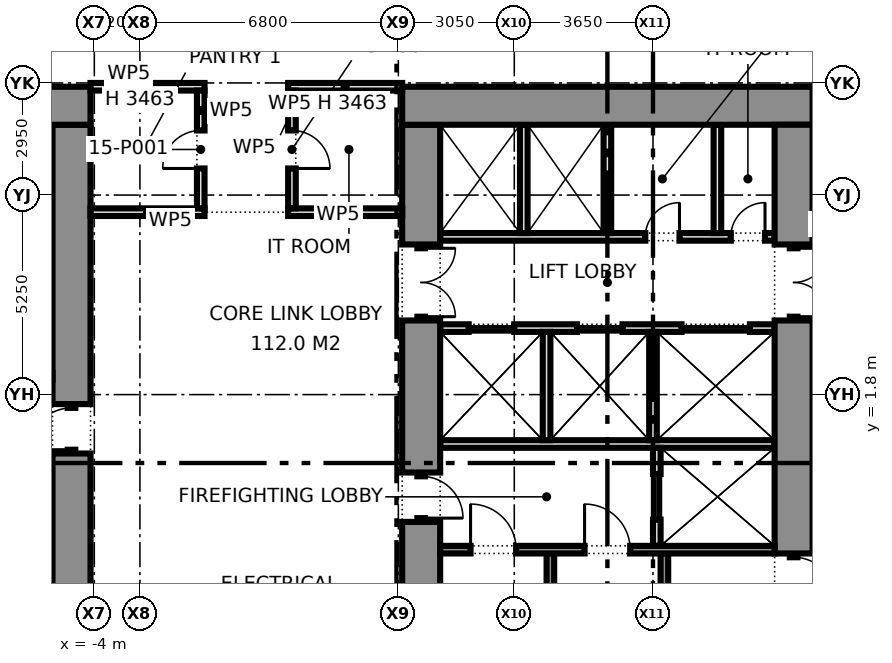
"""IFC4 building model, lengths in metres.
Left out: names, types, materials, properties, quantities, classifications, styles, units other than length and angle.
Written with IfcOpenShell. Run it as: python <this file> out.ifc"""

import sys

from ifc_helpers import new_model, si_unit, direction, frame, frame_2d, origin, place, context, subcontext, project, spatial, rectangle, extrude, element, fill, save


model = new_model("IFC4")
c1 = context("Model", 3, precision=1e-05, world=origin(), true_north=direction((0.0, 1.0)))
c2 = subcontext(c1, "Body", "Model", "MODEL_VIEW")
j1 = project(units=[si_unit("LENGTHUNIT", "METRE"), si_unit("PLANEANGLEUNIT", "RADIAN")], contexts=[c1])
p1 = place(None, origin())
s1 = spatial("IfcSite", under=j1, at=p1, CompositionType="ELEMENT")
p2 = place(p1, origin())
s2 = spatial("IfcBuilding", under=s1, at=p2, CompositionType="ELEMENT")
p3 = place(p2, frame((0.0, 0.0, 68.6)))
s3 = spatial("IfcBuildingStorey", under=s2, at=p3, CompositionType="ELEMENT", Elevation=68.6)
p4 = place(p3, frame((-14.9, 9.4, 0.0), z_axis=(0.0, 0.0, 1.0), x_axis=(1.0, 0.0, 0.0)))
e1 = element("IfcWall", 1, at=p4, inside=s3, PredefinedType="SHEAR", context=c2, shape_type="SweptSolid", body=[
    extrude(rectangle(XDim=10.8, YDim=1.0, at=frame_2d((5.4, 0.0))), origin(), (0.0, 0.0, 1.0), 4.4),
])
p5 = place(p3, frame((-4.6, -3.75, 0.0), z_axis=(0.0, 0.0, 1.0), x_axis=(0.0, 1.0, 0.0)))
e2 = element("IfcWall", 2, at=p5, inside=s3, PredefinedType="SHEAR", context=c2, shape_type="SweptSolid", body=[
    extrude(rectangle(XDim=4.0, YDim=1.0, at=frame_2d((2.0, 0.0))), origin(), (0.0, 0.0, 1.0), 4.4),
])
p6 = place(p3, frame((-4.6, 0.25, 0.0), z_axis=(0.0, 0.0, 1.0), x_axis=(0.0, 1.0, 0.0)))
e3 = element("IfcWall", 3, at=p6, inside=s3, PredefinedType="PARTITIONING", context=c2, shape_type="SweptSolid", body=[
    extrude(rectangle(XDim=1.3, YDim=0.2, at=frame_2d((0.65, 0.0))), origin(), (0.0, 0.0, 1.0), 2.4),
])
p7 = place(p6, frame((0.1, 0.0, 0.0)))
e4 = element("IfcOpeningElement", 4, at=p7, cuts=e3, PredefinedType="OPENING", context=c2, shape_type="SweptSolid", body=[
    extrude(rectangle(XDim=1.1, YDim=2.1, at=frame_2d((0.55, 1.05))), frame((0.0, 0.11, 0.0), z_axis=(0.0, -1.0, 0.0), x_axis=(1.0, 0.0, 0.0)), (0.0, 0.0, 1.0), 0.22),
])
p8 = place(p3, frame((-4.6, 1.55, 0.0), z_axis=(0.0, 0.0, 1.0), x_axis=(0.0, 1.0, 0.0)))
e5 = element("IfcWall", 5, at=p8, inside=s3, PredefinedType="SHEAR", context=c2, shape_type="SweptSolid", body=[
    extrude(rectangle(XDim=7.35, YDim=1.0, at=frame_2d((3.675, 0.0))), origin(), (0.0, 0.0, 1.0), 4.4),
])
p9 = place(p3, frame((14.9, 9.4, 0.0), z_axis=(0.0, 0.0, 1.0), x_axis=(-1.0, 0.0, 0.0)))
e6 = element("IfcWall", 6, at=p9, inside=s3, PredefinedType="SHEAR", context=c2, shape_type="SweptSolid", body=[
    extrude(rectangle(XDim=10.8, YDim=1.0, at=frame_2d((5.4, 0.0))), origin(), (0.0, 0.0, 1.0), 4.4),
])
p10 = place(p3, frame((14.4, 8.9, 0.0), z_axis=(0.0, 0.0, 1.0), x_axis=(0.0, -1.0, 0.0)))
e7 = element("IfcWall", 7, at=p10, inside=s3, PredefinedType="SHEAR", context=c2, shape_type="SweptSolid", body=[
    extrude(rectangle(XDim=3.15, YDim=1.0, at=frame_2d((1.575, 0.0))), origin(), (0.0, 0.0, 1.0), 4.4),
])
p11 = place(p3, frame((14.4, 5.75, 0.0), z_axis=(0.0, 0.0, 1.0), x_axis=(0.0, -1.0, 0.0)))
e8 = element("IfcWall", 8, at=p11, inside=s3, PredefinedType="PARTITIONING", context=c2, shape_type="SweptSolid", body=[
    extrude(rectangle(XDim=2.0, YDim=0.2, at=frame_2d((1.0, 0.0))), origin(), (0.0, 0.0, 1.0), 2.4),
])
p12 = place(p11, frame((0.1, 0.0, 0.0)))
e9 = element("IfcOpeningElement", 9, at=p12, cuts=e8, PredefinedType="OPENING", context=c2, shape_type="SweptSolid", body=[
    extrude(rectangle(XDim=1.8, YDim=2.1, at=frame_2d((0.9, 1.05))), frame((0.0, 0.11, 0.0), z_axis=(0.0, -1.0, 0.0), x_axis=(1.0, 0.0, 0.0)), (0.0, 0.0, 1.0), 0.22),
])
p13 = place(p3, frame((14.4, 3.75, 0.0), z_axis=(0.0, 0.0, 1.0), x_axis=(0.0, -1.0, 0.0)))
e10 = element("IfcWall", 10, at=p13, inside=s3, PredefinedType="SHEAR", context=c2, shape_type="SweptSolid", body=[
    extrude(rectangle(XDim=6.13, YDim=1.0, at=frame_2d((3.065, 0.0))), origin(), (0.0, 0.0, 1.0), 4.4),
])
p14 = place(p3, frame((14.4, -2.38, 0.0), z_axis=(0.0, 0.0, 1.0), x_axis=(0.0, -1.0, 0.0)))
e11 = element("IfcWall", 11, at=p14, inside=s3, PredefinedType="SHEAR", context=c2, shape_type="SweptSolid", body=[
    extrude(rectangle(XDim=1.3, YDim=0.2, at=frame_2d((0.65, 0.0))), origin(), (0.0, 0.0, 1.0), 2.4),
])
p15 = place(p14, frame((0.1, 0.0, 0.0)))
e12 = element("IfcOpeningElement", 12, at=p15, cuts=e11, PredefinedType="OPENING", context=c2, shape_type="SweptSolid", body=[
    extrude(rectangle(XDim=1.1, YDim=2.1, at=frame_2d((0.55, 1.05))), frame((0.0, 0.11, 0.0), z_axis=(0.0, -1.0, 0.0), x_axis=(1.0, 0.0, 0.0)), (0.0, 0.0, 1.0), 0.22),
])
p16 = place(p3, frame((4.6, 8.9, 0.0), z_axis=(0.0, 0.0, 1.0), x_axis=(0.0, -1.0, 0.0)))
e13 = element("IfcWall", 13, at=p16, inside=s3, PredefinedType="SHEAR", context=c2, shape_type="SweptSolid", body=[
    extrude(rectangle(XDim=3.15, YDim=1.0, at=frame_2d((1.575, 0.0))), origin(), (0.0, 0.0, 1.0), 4.4),
])
p17 = place(p3, frame((4.6, 5.75, 0.0), z_axis=(0.0, 0.0, 1.0), x_axis=(0.0, -1.0, 0.0)))
e14 = element("IfcWall", 14, at=p17, inside=s3, PredefinedType="PARTITIONING", context=c2, shape_type="SweptSolid", body=[
    extrude(rectangle(XDim=2.0, YDim=0.2, at=frame_2d((1.0, 0.0))), origin(), (0.0, 0.0, 1.0), 2.4),
])
p18 = place(p17, frame((0.1, 0.0, 0.0)))
e15 = element("IfcOpeningElement", 15, at=p18, cuts=e14, PredefinedType="OPENING", context=c2, shape_type="SweptSolid", body=[
    extrude(rectangle(XDim=1.8, YDim=2.1, at=frame_2d((0.9, 1.05))), frame((0.0, 0.11, 0.0), z_axis=(0.0, -1.0, 0.0), x_axis=(1.0, 0.0, 0.0)), (0.0, 0.0, 1.0), 0.22),
])
p19 = place(p3, frame((4.6, 3.75, 0.0), z_axis=(0.0, 0.0, 1.0), x_axis=(0.0, -1.0, 0.0)))
e16 = element("IfcWall", 16, at=p19, inside=s3, PredefinedType="SHEAR", context=c2, shape_type="SweptSolid", body=[
    extrude(rectangle(XDim=4.0, YDim=1.0, at=frame_2d((2.0, 0.0))), origin(), (0.0, 0.0, 1.0), 4.4),
])
p20 = place(p3, frame((4.6, -0.25, 0.0), z_axis=(0.0, 0.0, 1.0), x_axis=(0.0, -1.0, 0.0)))
e17 = element("IfcWall", 17, at=p20, inside=s3, PredefinedType="PARTITIONING", context=c2, shape_type="SweptSolid", body=[
    extrude(rectangle(XDim=1.3, YDim=0.2, at=frame_2d((0.65, 0.0))), origin(), (0.0, 0.0, 1.0), 2.4),
])
p21 = place(p20, frame((0.1, 0.0, 0.0)))
e18 = element("IfcOpeningElement", 18, at=p21, cuts=e17, PredefinedType="OPENING", context=c2, shape_type="SweptSolid", body=[
    extrude(rectangle(XDim=1.1, YDim=2.1, at=frame_2d((0.55, 1.05))), frame((0.0, 0.11, 0.0), z_axis=(0.0, -1.0, 0.0), x_axis=(1.0, 0.0, 0.0)), (0.0, 0.0, 1.0), 0.22),
])
p22 = place(p3, frame((4.6, -1.55, 0.0), z_axis=(0.0, 0.0, 1.0), x_axis=(0.0, -1.0, 0.0)))
e19 = element("IfcWall", 19, at=p22, inside=s3, PredefinedType="SHEAR", context=c2, shape_type="SweptSolid", body=[
    extrude(rectangle(XDim=7.35, YDim=1.0, at=frame_2d((3.675, 0.0))), origin(), (0.0, 0.0, 1.0), 4.4),
])
p23 = place(p3, frame((13.9, 5.95, 0.0), z_axis=(0.0, 0.0, 1.0), x_axis=(-1.0, 0.0, 0.0)))
e20 = element("IfcWall", 20, at=p23, inside=s3, PredefinedType="PARTITIONING", context=c2, shape_type="SweptSolid", body=[
    extrude(rectangle(XDim=8.8, YDim=0.2, at=frame_2d((4.4, 0.0))), origin(), (0.0, 0.0, 1.0), 4.4),
])
p24 = place(p23, frame((0.252, 0.0, 0.0)))
e21 = element("IfcOpeningElement", 21, at=p24, cuts=e20, PredefinedType="OPENING", context=c2, shape_type="SweptSolid", body=[
    extrude(rectangle(XDim=0.9, YDim=2.1, at=frame_2d((0.45, 1.05))), frame((0.0, 0.11, 0.0), z_axis=(0.0, -1.0, 0.0), x_axis=(1.0, 0.0, 0.0)), (0.0, 0.0, 1.0), 0.22),
])
p25 = place(p23, frame((2.502, 0.0, 0.0)))
e22 = element("IfcOpeningElement", 22, at=p25, cuts=e20, PredefinedType="OPENING", context=c2, shape_type="SweptSolid", body=[
    extrude(rectangle(XDim=0.9, YDim=2.1, at=frame_2d((0.45, 1.05))), frame((0.0, 0.11, 0.0), z_axis=(0.0, -1.0, 0.0), x_axis=(1.0, 0.0, 0.0)), (0.0, 0.0, 1.0), 0.22),
])
p26 = place(p3, frame((13.9, 3.55, 0.0), z_axis=(0.0, 0.0, 1.0), x_axis=(-1.0, 0.0, 0.0)))
e23 = element("IfcWall", 23, at=p26, inside=s3, PredefinedType="PARTITIONING", context=c2, shape_type="SweptSolid", body=[
    extrude(rectangle(XDim=8.8, YDim=0.2, at=frame_2d((4.4, 0.0))), origin(), (0.0, 0.0, 1.0), 4.4),
])
p27 = place(p26, frame((0.65, 0.0, 0.0)))
e24 = element("IfcOpeningElement", 24, at=p27, cuts=e23, PredefinedType="OPENING", context=c2, shape_type="SweptSolid", body=[
    extrude(rectangle(XDim=1.8, YDim=2.1, at=frame_2d((0.9, 1.05))), frame((0.0, 0.11, 0.0), z_axis=(0.0, -1.0, 0.0), x_axis=(1.0, 0.0, 0.0)), (0.0, 0.0, 1.0), 0.22),
])
p28 = place(p26, frame((4.0, 0.0, 0.0)))
e25 = element("IfcOpeningElement", 25, at=p28, cuts=e23, PredefinedType="OPENING", context=c2, shape_type="SweptSolid", body=[
    extrude(rectangle(XDim=1.2, YDim=2.1, at=frame_2d((0.6, 1.05))), frame((0.0, 0.11, 0.0), z_axis=(0.0, -1.0, 0.0), x_axis=(1.0, 0.0, 0.0)), (0.0, 0.0, 1.0), 0.22),
])
p29 = place(p26, frame((6.85, 0.0, 0.0)))
e26 = element("IfcOpeningElement", 26, at=p29, cuts=e23, PredefinedType="OPENING", context=c2, shape_type="SweptSolid", body=[
    extrude(rectangle(XDim=1.2, YDim=2.1, at=frame_2d((0.6, 1.05))), frame((0.0, 0.11, 0.0), z_axis=(0.0, -1.0, 0.0), x_axis=(1.0, 0.0, 0.0)), (0.0, 0.0, 1.0), 0.22),
])
p30 = place(p3, frame((13.9, 0.5, 0.0), z_axis=(0.0, 0.0, 1.0), x_axis=(-1.0, 0.0, 0.0)))
e27 = element("IfcWall", 27, at=p30, inside=s3, PredefinedType="PARTITIONING", context=c2, shape_type="SweptSolid", body=[
    extrude(rectangle(XDim=8.8, YDim=0.2, at=frame_2d((4.4, 0.0))), origin(), (0.0, 0.0, 1.0), 4.4),
])
p31 = place(p3, frame((10.8, 0.4, 0.0), z_axis=(0.0, 0.0, 1.0), x_axis=(0.0, -1.0, 0.0)))
e28 = element("IfcWall", 28, at=p31, inside=s3, PredefinedType="PARTITIONING", context=c2, shape_type="SweptSolid", body=[
    extrude(rectangle(XDim=2.58, YDim=0.2, at=frame_2d((1.29, 0.0))), origin(), (0.0, 0.0, 1.0), 4.4),
])
p32 = place(p31, frame((0.69, 0.0, 0.0)))
e29 = element("IfcOpeningElement", 29, at=p32, cuts=e28, PredefinedType="OPENING", context=c2, shape_type="SweptSolid", body=[
    extrude(rectangle(XDim=1.2, YDim=2.1, at=frame_2d((0.6, 1.05))), frame((0.0, 0.11, 0.0), z_axis=(0.0, -1.0, 0.0), x_axis=(1.0, 0.0, 0.0)), (0.0, 0.0, 1.0), 0.22),
])
p33 = place(p3, frame((13.9, -2.28, 0.0), z_axis=(0.0, 0.0, 1.0), x_axis=(-1.0, 0.0, 0.0)))
e30 = element("IfcWall", 30, at=p33, inside=s3, PredefinedType="SHEAR", context=c2, shape_type="SweptSolid", body=[
    extrude(rectangle(XDim=8.8, YDim=0.2, at=frame_2d((4.4, 0.0))), origin(), (0.0, 0.0, 1.0), 4.4),
])
p34 = place(p33, frame((3.8, 0.0, 0.0)))
e31 = element("IfcOpeningElement", 31, at=p34, cuts=e30, PredefinedType="OPENING", context=c2, shape_type="SweptSolid", body=[
    extrude(rectangle(XDim=1.2, YDim=2.1, at=frame_2d((0.6, 1.05))), frame((0.0, 0.11, 0.0), z_axis=(0.0, -1.0, 0.0), x_axis=(1.0, 0.0, 0.0)), (0.0, 0.0, 1.0), 0.22),
])
p35 = place(p33, frame((6.8, 0.0, 0.0)))
e32 = element("IfcOpeningElement", 32, at=p35, cuts=e30, PredefinedType="OPENING", context=c2, shape_type="SweptSolid", body=[
    extrude(rectangle(XDim=1.2, YDim=2.1, at=frame_2d((0.6, 1.05))), frame((0.0, 0.11, 0.0), z_axis=(0.0, -1.0, 0.0), x_axis=(1.0, 0.0, 0.0)), (0.0, 0.0, 1.0), 0.22),
])
for number, where, z_axis, x_axis in (
    (33, (11.0, -2.38, 0.0), (0.0, 0.0, 1.0), (0.0, -1.0, 0.0)),
    (34, (8.0, -2.38, 0.0), (0.0, 0.0, 1.0), (0.0, -1.0, 0.0)),
):
    element("IfcWall", number, at=place(p3, frame(where, z_axis=z_axis, x_axis=x_axis)), inside=s3, PredefinedType="SHEAR", context=c2, shape_type="SweptSolid", body=[
        extrude(rectangle(XDim=6.52, YDim=0.2, at=frame_2d((3.26, 0.0))), origin(), (0.0, 0.0, 1.0), 4.4),
    ])
for number, where, z_axis, x_axis in (
    (35, (9.5, 8.9, 0.0), (0.0, 0.0, 1.0), (0.0, -1.0, 0.0)),
    (36, (7.3, 8.9, 0.0), (0.0, 0.0, 1.0), (0.0, -1.0, 0.0)),
    (37, (12.395, 8.9, 0.0), (0.0, 0.0, 1.0), (0.0, -1.0, 0.0)),
    (38, (10.7, 3.45, 0.0), (0.0, 0.0, 1.0), (0.0, -1.0, 0.0)),
    (39, (7.9, 3.45, 0.0), (0.0, 0.0, 1.0), (0.0, -1.0, 0.0)),
):
    element("IfcWall", number, at=place(p3, frame(where, z_axis=z_axis, x_axis=x_axis)), inside=s3, PredefinedType="PARTITIONING", context=c2, shape_type="SweptSolid", body=[
        extrude(rectangle(XDim=2.85, YDim=0.2, at=frame_2d((1.425, 0.0))), origin(), (0.0, 0.0, 1.0), 4.4),
    ])
for number, where, z_axis, x_axis in (
    (40, (-4.1, 6.6, 0.0), (0.0, 0.0, 1.0), (1.0, 0.0, 0.0)),
    (41, (1.1, 6.6, 0.0), (0.0, 0.0, 1.0), (1.0, 0.0, 0.0)),
):
    element("IfcWall", number, at=place(p3, frame(where, z_axis=z_axis, x_axis=x_axis)), inside=s3, PredefinedType="PARTITIONING", context=c2, shape_type="SweptSolid", body=[
        extrude(rectangle(XDim=3.0, YDim=0.2, at=frame_2d((1.5, 0.0))), origin(), (0.0, 0.0, 1.0), 4.4),
    ])
for number, where, z_axis, x_axis in (
    (42, (-4.1, 9.9, 0.0), (0.0, 0.0, 1.0), (1.0, 0.0, 0.0)),
    (43, (1.1, 9.9, 0.0), (0.0, 0.0, 1.0), (1.0, 0.0, 0.0)),
):
    element("IfcWall", number, at=place(p3, frame(where, z_axis=z_axis, x_axis=x_axis)), inside=s3, PredefinedType="PARTITIONING", context=c2, shape_type="SweptSolid", body=[
        extrude(rectangle(XDim=3.0, YDim=0.2, at=frame_2d((1.5, 0.0))), origin(), (0.0, 0.0, 1.0), 3.463),
    ])
p36 = place(p3, frame((1.2, 6.7, 0.0), z_axis=(0.0, 0.0, 1.0), x_axis=(0.0, 1.0, 0.0)))
e44 = element("IfcWall", 44, at=p36, inside=s3, PredefinedType="PARTITIONING", context=c2, shape_type="SweptSolid", body=[
    extrude(rectangle(XDim=3.1, YDim=0.2, at=frame_2d((1.55, 0.0))), origin(), (0.0, 0.0, 1.0), 4.4),
])
p37 = place(p36, frame((1.05, 0.0, 0.0)))
e45 = element("IfcOpeningElement", 45, at=p37, cuts=e44, PredefinedType="OPENING", context=c2, shape_type="SweptSolid", body=[
    extrude(rectangle(XDim=1.0, YDim=2.1, at=frame_2d((0.5, 1.05))), frame((0.0, 0.11, 0.0), z_axis=(0.0, -1.0, 0.0), x_axis=(1.0, 0.0, 0.0)), (0.0, 0.0, 1.0), 0.22),
])
p38 = place(p3, frame((-1.2, 6.7, 0.0), z_axis=(0.0, 0.0, 1.0), x_axis=(0.0, 1.0, 0.0)))
e46 = element("IfcWall", 46, at=p38, inside=s3, PredefinedType="PARTITIONING", context=c2, shape_type="SweptSolid", body=[
    extrude(rectangle(XDim=3.1, YDim=0.2, at=frame_2d((1.55, 0.0))), origin(), (0.0, 0.0, 1.0), 4.4),
])
p39 = place(p38, frame((1.05, 0.0, 0.0)))
e47 = element("IfcOpeningElement", 47, at=p39, cuts=e46, PredefinedType="OPENING", context=c2, shape_type="SweptSolid", body=[
    extrude(rectangle(XDim=1.0, YDim=2.1, at=frame_2d((0.5, 1.05))), frame((0.0, 0.11, 0.0), z_axis=(0.0, -1.0, 0.0), x_axis=(1.0, 0.0, 0.0)), (0.0, 0.0, 1.0), 0.22),
])
p40 = place(p7, origin())
e48 = element("IfcDoor", 48, at=p40, inside=s3, OperationType="SINGLE_SWING_LEFT", PredefinedType="DOOR", context=c2, shape_type="SweptSolid", body=[
    extrude(rectangle(XDim=1.1, YDim=2.1, at=frame_2d((0.55, 1.05))), frame((0.0, 0.025, 0.0), z_axis=(0.0, -1.0, 0.0), x_axis=(1.0, 0.0, 0.0)), (0.0, 0.0, 1.0), 0.05),
])
fill(e4, e48)
p41 = place(p12, origin())
e49 = element("IfcDoor", 49, at=p41, inside=s3, OperationType="DOUBLE_DOOR_SINGLE_SWING", PredefinedType="DOOR", context=c2, shape_type="SweptSolid", body=[
    extrude(rectangle(XDim=1.8, YDim=2.1, at=frame_2d((0.9, 1.05))), frame((0.0, 0.025, 0.0), z_axis=(0.0, -1.0, 0.0), x_axis=(1.0, 0.0, 0.0)), (0.0, 0.0, 1.0), 0.05),
])
fill(e9, e49)
p42 = place(p15, origin())
e50 = element("IfcDoor", 50, at=p42, inside=s3, OperationType="SINGLE_SWING_RIGHT", PredefinedType="DOOR", context=c2, shape_type="SweptSolid", body=[
    extrude(rectangle(XDim=1.1, YDim=2.1, at=frame_2d((0.55, 1.05))), frame((0.0, 0.025, 0.0), z_axis=(0.0, -1.0, 0.0), x_axis=(1.0, 0.0, 0.0)), (0.0, 0.0, 1.0), 0.05),
])
fill(e12, e50)
p43 = place(p18, origin())
e51 = element("IfcDoor", 51, at=p43, inside=s3, OperationType="DOUBLE_DOOR_SINGLE_SWING", PredefinedType="DOOR", context=c2, shape_type="SweptSolid", body=[
    extrude(rectangle(XDim=1.8, YDim=2.1, at=frame_2d((0.9, 1.05))), frame((0.0, 0.025, 0.0), z_axis=(0.0, -1.0, 0.0), x_axis=(1.0, 0.0, 0.0)), (0.0, 0.0, 1.0), 0.05),
])
fill(e15, e51)
p44 = place(p21, origin())
e52 = element("IfcDoor", 52, at=p44, inside=s3, OperationType="SINGLE_SWING_RIGHT", PredefinedType="DOOR", context=c2, shape_type="SweptSolid", body=[
    extrude(rectangle(XDim=1.1, YDim=2.1, at=frame_2d((0.55, 1.05))), frame((0.0, 0.025, 0.0), z_axis=(0.0, -1.0, 0.0), x_axis=(1.0, 0.0, 0.0)), (0.0, 0.0, 1.0), 0.05),
])
fill(e18, e52)
p45 = place(p27, origin())
e53 = element("IfcDoor", 53, at=p45, inside=s3, OperationType="DOUBLE_DOOR_SLIDING", PredefinedType="DOOR", context=c2, shape_type="SweptSolid", body=[
    extrude(rectangle(XDim=1.8, YDim=2.1, at=frame_2d((0.9, 1.05))), frame((0.0, 0.025, 0.0), z_axis=(0.0, -1.0, 0.0), x_axis=(1.0, 0.0, 0.0)), (0.0, 0.0, 1.0), 0.05),
])
fill(e24, e53)
p46 = place(p28, origin())
e54 = element("IfcDoor", 54, at=p46, inside=s3, OperationType="DOUBLE_DOOR_SLIDING", PredefinedType="DOOR", context=c2, shape_type="SweptSolid", body=[
    extrude(rectangle(XDim=1.2, YDim=2.1, at=frame_2d((0.6, 1.05))), frame((0.0, 0.025, 0.0), z_axis=(0.0, -1.0, 0.0), x_axis=(1.0, 0.0, 0.0)), (0.0, 0.0, 1.0), 0.05),
])
fill(e25, e54)
p47 = place(p29, origin())
e55 = element("IfcDoor", 55, at=p47, inside=s3, OperationType="DOUBLE_DOOR_SLIDING", PredefinedType="DOOR", context=c2, shape_type="SweptSolid", body=[
    extrude(rectangle(XDim=1.2, YDim=2.1, at=frame_2d((0.6, 1.05))), frame((0.0, 0.025, 0.0), z_axis=(0.0, -1.0, 0.0), x_axis=(1.0, 0.0, 0.0)), (0.0, 0.0, 1.0), 0.05),
])
fill(e26, e55)
p48 = place(p32, origin())
e56 = element("IfcDoor", 56, at=p48, inside=s3, OperationType="DOUBLE_DOOR_SLIDING", PredefinedType="DOOR", context=c2, shape_type="SweptSolid", body=[
    extrude(rectangle(XDim=1.2, YDim=2.1, at=frame_2d((0.6, 1.05))), frame((0.0, 0.025, 0.0), z_axis=(0.0, -1.0, 0.0), x_axis=(1.0, 0.0, 0.0)), (0.0, 0.0, 1.0), 0.05),
])
fill(e29, e56)
p49 = place(p24, frame((0.9, 0.0, 0.0), z_axis=(0.0, 0.0, 1.0), x_axis=(-1.0, 0.0, 0.0)))
e57 = element("IfcDoor", 57, at=p49, inside=s3, OperationType="SINGLE_SWING_RIGHT", PredefinedType="DOOR", context=c2, shape_type="SweptSolid", body=[
    extrude(rectangle(XDim=0.9, YDim=2.1, at=frame_2d((0.45, 1.05))), frame((0.0, 0.025, 0.0), z_axis=(0.0, -1.0, 0.0), x_axis=(1.0, 0.0, 0.0)), (0.0, 0.0, 1.0), 0.05),
])
fill(e21, e57)
p50 = place(p25, frame((0.9, 0.0, 0.0), z_axis=(0.0, 0.0, 1.0), x_axis=(-1.0, 0.0, 0.0)))
e58 = element("IfcDoor", 58, at=p50, inside=s3, OperationType="SINGLE_SWING_RIGHT", PredefinedType="DOOR", context=c2, shape_type="SweptSolid", body=[
    extrude(rectangle(XDim=0.9, YDim=2.1, at=frame_2d((0.45, 1.05))), frame((0.0, 0.025, 0.0), z_axis=(0.0, -1.0, 0.0), x_axis=(1.0, 0.0, 0.0)), (0.0, 0.0, 1.0), 0.05),
])
fill(e22, e58)
p51 = place(p34, frame((1.2, 0.0, 0.0), z_axis=(0.0, 0.0, 1.0), x_axis=(-1.0, 0.0, 0.0)))
e59 = element("IfcDoor", 59, at=p51, inside=s3, OperationType="SINGLE_SWING_LEFT", PredefinedType="DOOR", context=c2, shape_type="SweptSolid", body=[
    extrude(rectangle(XDim=1.2, YDim=2.1, at=frame_2d((0.6, 1.05))), frame((0.0, 0.025, 0.0), z_axis=(0.0, -1.0, 0.0), x_axis=(1.0, 0.0, 0.0)), (0.0, 0.0, 1.0), 0.05),
])
fill(e31, e59)
p52 = place(p35, frame((1.2, 0.0, 0.0), z_axis=(0.0, 0.0, 1.0), x_axis=(-1.0, 0.0, 0.0)))
e60 = element("IfcDoor", 60, at=p52, inside=s3, OperationType="SINGLE_SWING_LEFT", PredefinedType="DOOR", context=c2, shape_type="SweptSolid", body=[
    extrude(rectangle(XDim=1.2, YDim=2.1, at=frame_2d((0.6, 1.05))), frame((0.0, 0.025, 0.0), z_axis=(0.0, -1.0, 0.0), x_axis=(1.0, 0.0, 0.0)), (0.0, 0.0, 1.0), 0.05),
])
fill(e32, e60)
p53 = place(p39, origin())
e61 = element("IfcDoor", 61, at=p53, inside=s3, OperationType="SINGLE_SWING_LEFT", PredefinedType="DOOR", context=c2, shape_type="SweptSolid", body=[
    extrude(rectangle(XDim=1.0, YDim=2.1, at=frame_2d((0.5, 1.05))), frame((0.0, 0.025, 0.0), z_axis=(0.0, -1.0, 0.0), x_axis=(1.0, 0.0, 0.0)), (0.0, 0.0, 1.0), 0.05),
])
fill(e47, e61)
p54 = place(p37, frame((1.0, 0.0, 0.0), z_axis=(0.0, 0.0, 1.0), x_axis=(-1.0, 0.0, 0.0)))
e62 = element("IfcDoor", 62, at=p54, inside=s3, OperationType="SINGLE_SWING_RIGHT", PredefinedType="DOOR", context=c2, shape_type="SweptSolid", body=[
    extrude(rectangle(XDim=1.0, YDim=2.1, at=frame_2d((0.5, 1.05))), frame((0.0, 0.025, 0.0), z_axis=(0.0, -1.0, 0.0), x_axis=(1.0, 0.0, 0.0)), (0.0, 0.0, 1.0), 0.05),
])
fill(e45, e62)
save(model, sys.argv[1])
